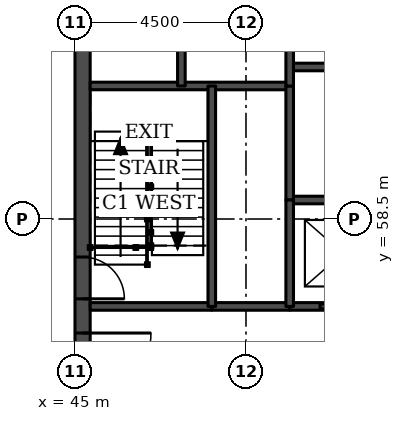
"""IFC4 building model, lengths in metres.
Left out: names, types, materials, properties, quantities, classifications, styles, units other than length and angle.
Written with IfcOpenShell. Run it as: python <this file> out.ifc"""

import sys

from ifc_helpers import new_model, si_unit, direction, frame, frame_2d, origin, place, context, subcontext, project, spatial, rectangle, extrude, element, fill, save


model = new_model("IFC4")
c1 = context("Model", 3, precision=1e-05, world=origin(), true_north=direction((0.0, 1.0)))
c2 = subcontext(c1, "Body", "Model", "MODEL_VIEW")
j1 = project(units=[si_unit("LENGTHUNIT", "METRE"), si_unit("PLANEANGLEUNIT", "RADIAN")], contexts=[c1])
p1 = place(None, origin())
s1 = spatial("IfcSite", under=j1, at=p1, CompositionType="ELEMENT")
p2 = place(p1, origin())
s2 = spatial("IfcBuilding", under=s1, at=p2, CompositionType="ELEMENT")
p3 = place(p2, frame((0.0, 0.0, 199.5)))
s3 = spatial("IfcBuildingStorey", under=s2, at=p3, CompositionType="ELEMENT", Elevation=199.5)
p4 = place(p3, frame((45.2, 49.5, 0.0), z_axis=(0.0, 0.0, 1.0), x_axis=(0.0, 1.0, 0.0)))
e1 = element("IfcWall", 1, at=p4, inside=s3, PredefinedType="SHEAR", context=c2, shape_type="SweptSolid", body=[
    extrude(rectangle(XDim=22.5, YDim=0.4, at=frame_2d((11.25, 0.0))), origin(), (0.0, 0.0, 1.0), 3.7),
])
p5 = place(p4, frame((4.2, 0.0, 0.0)))
e2 = element("IfcOpeningElement", 2, at=p5, cuts=e1, PredefinedType="OPENING", context=c2, shape_type="SweptSolid", body=[
    extrude(rectangle(XDim=1.8, YDim=2.1, at=frame_2d((0.9, 1.05))), frame((0.0, 0.21, 0.0), z_axis=(0.0, -1.0, 0.0), x_axis=(1.0, 0.0, 0.0)), (0.0, 0.0, 1.0), 0.42),
])
p6 = place(p4, frame((6.9, 0.0, 0.0)))
e3 = element("IfcOpeningElement", 3, at=p6, cuts=e1, PredefinedType="OPENING", context=c2, shape_type="SweptSolid", body=[
    extrude(rectangle(XDim=1.1, YDim=2.1, at=frame_2d((0.55, 1.05))), frame((0.0, 0.21, 0.0), z_axis=(0.0, -1.0, 0.0), x_axis=(1.0, 0.0, 0.0)), (0.0, 0.0, 1.0), 0.42),
])
p7 = place(p4, frame((13.6, 0.0, 0.0)))
e4 = element("IfcOpeningElement", 4, at=p7, cuts=e1, PredefinedType="OPENING", context=c2, shape_type="SweptSolid", body=[
    extrude(rectangle(XDim=1.1, YDim=2.1, at=frame_2d((0.55, 1.05))), frame((0.0, 0.21, 0.0), z_axis=(0.0, -1.0, 0.0), x_axis=(1.0, 0.0, 0.0)), (0.0, 0.0, 1.0), 0.42),
])
p8 = place(p4, frame((16.5, 0.0, 0.0)))
e5 = element("IfcOpeningElement", 5, at=p8, cuts=e1, PredefinedType="OPENING", context=c2, shape_type="SweptSolid", body=[
    extrude(rectangle(XDim=1.8, YDim=2.1, at=frame_2d((0.9, 1.05))), frame((0.0, 0.21, 0.0), z_axis=(0.0, -1.0, 0.0), x_axis=(1.0, 0.0, 0.0)), (0.0, 0.0, 1.0), 0.42),
])
p9 = place(p3, frame((48.6, 56.2, 0.0), z_axis=(0.0, 0.0, 1.0), x_axis=(1.0, 0.0, 0.0)))
e6 = element("IfcWall", 6, at=p9, inside=s3, PredefinedType="SOLIDWALL", context=c2, shape_type="SweptSolid", body=[
    extrude(rectangle(XDim=2.05, YDim=0.2, at=frame_2d((1.025, 0.0))), origin(), (0.0, 0.0, 1.0), 3.55),
])
p10 = place(p3, frame((45.4, 56.2, 0.0), z_axis=(0.0, 0.0, 1.0), x_axis=(1.0, 0.0, 0.0)))
e7 = element("IfcWall", 7, at=p10, inside=s3, PredefinedType="SOLIDWALL", context=c2, shape_type="SweptSolid", body=[
    extrude(rectangle(XDim=3.2, YDim=0.2, at=frame_2d((1.6, 0.0))), origin(), (0.0, 0.0, 1.0), 3.55),
])
p11 = place(p3, frame((50.65, 56.2, 0.0), z_axis=(0.0, 0.0, 1.0), x_axis=(1.0, 0.0, 0.0)))
e8 = element("IfcWall", 8, at=p11, inside=s3, PredefinedType="SOLIDWALL", context=c2, shape_type="SweptSolid", body=[
    extrude(rectangle(XDim=11.2, YDim=0.2, at=frame_2d((5.6, 0.0))), origin(), (0.0, 0.0, 1.0), 3.55),
])
p12 = place(p11, frame((0.8, 0.0, 0.0)))
e9 = element("IfcOpeningElement", 9, at=p12, cuts=e8, PredefinedType="OPENING", context=c2, shape_type="SweptSolid", body=[
    extrude(rectangle(XDim=1.2, YDim=2.1, at=frame_2d((0.6, 1.05))), frame((0.0, 0.11, 0.0), z_axis=(0.0, -1.0, 0.0), x_axis=(1.0, 0.0, 0.0)), (0.0, 0.0, 1.0), 0.22),
])
p13 = place(p11, frame((3.6, 0.0, 0.0)))
e10 = element("IfcOpeningElement", 10, at=p13, cuts=e8, PredefinedType="OPENING", context=c2, shape_type="SweptSolid", body=[
    extrude(rectangle(XDim=1.2, YDim=2.1, at=frame_2d((0.6, 1.05))), frame((0.0, 0.11, 0.0), z_axis=(0.0, -1.0, 0.0), x_axis=(1.0, 0.0, 0.0)), (0.0, 0.0, 1.0), 0.22),
])
p14 = place(p11, frame((6.4, 0.0, 0.0)))
e11 = element("IfcOpeningElement", 11, at=p14, cuts=e8, PredefinedType="OPENING", context=c2, shape_type="SweptSolid", body=[
    extrude(rectangle(XDim=1.2, YDim=2.1, at=frame_2d((0.6, 1.05))), frame((0.0, 0.11, 0.0), z_axis=(0.0, -1.0, 0.0), x_axis=(1.0, 0.0, 0.0)), (0.0, 0.0, 1.0), 0.22),
])
p15 = place(p11, frame((9.2, 0.0, 0.0)))
e12 = element("IfcOpeningElement", 12, at=p15, cuts=e8, PredefinedType="OPENING", context=c2, shape_type="SweptSolid", body=[
    extrude(rectangle(XDim=1.2, YDim=2.1, at=frame_2d((0.6, 1.05))), frame((0.0, 0.11, 0.0), z_axis=(0.0, -1.0, 0.0), x_axis=(1.0, 0.0, 0.0)), (0.0, 0.0, 1.0), 0.22),
])
p16 = place(p3, frame((50.65, 59.0, 0.0), z_axis=(0.0, 0.0, 1.0), x_axis=(1.0, 0.0, 0.0)))
e13 = element("IfcWall", 13, at=p16, inside=s3, PredefinedType="SOLIDWALL", context=c2, shape_type="SweptSolid", body=[
    extrude(rectangle(XDim=11.2, YDim=0.2, at=frame_2d((5.6, 0.0))), origin(), (0.0, 0.0, 1.0), 3.7),
])
p17 = place(p3, frame((45.4, 62.0, 0.0), z_axis=(0.0, 0.0, 1.0), x_axis=(1.0, 0.0, 0.0)))
e14 = element("IfcWall", 14, at=p17, inside=s3, PredefinedType="SOLIDWALL", context=c2, shape_type="SweptSolid", body=[
    extrude(rectangle(XDim=5.25, YDim=0.2, at=frame_2d((2.625, 0.0))), origin(), (0.0, 0.0, 1.0), 3.55),
])
p18 = place(p3, frame((50.65, 62.5, 0.0), z_axis=(0.0, 0.0, 1.0), x_axis=(1.0, 0.0, 0.0)))
e15 = element("IfcWall", 15, at=p18, inside=s3, PredefinedType="SOLIDWALL", context=c2, shape_type="SweptSolid", body=[
    extrude(rectangle(XDim=11.2, YDim=0.2, at=frame_2d((5.6, 0.0))), origin(), (0.0, 0.0, 1.0), 3.7),
])
p19 = place(p3, frame((47.8, 62.0, 0.0), z_axis=(0.0, 0.0, 1.0), x_axis=(0.0, 1.0, 0.0)))
e16 = element("IfcWall", 16, at=p19, inside=s3, PredefinedType="SOLIDWALL", context=c2, shape_type="SweptSolid", body=[
    extrude(rectangle(XDim=3.3, YDim=0.2, at=frame_2d((1.65, 0.0))), origin(), (0.0, 0.0, 1.0), 3.55),
])
p20 = place(p19, frame((1.1, 0.0, 0.0)))
e17 = element("IfcOpeningElement", 17, at=p20, cuts=e16, PredefinedType="OPENING", context=c2, shape_type="SweptSolid", body=[
    extrude(rectangle(XDim=1.1, YDim=2.1, at=frame_2d((0.55, 1.05))), frame((0.0, 0.11, 0.0), z_axis=(0.0, -1.0, 0.0), x_axis=(1.0, 0.0, 0.0)), (0.0, 0.0, 1.0), 0.22),
])
p21 = place(p3, frame((48.6, 56.2, 0.0), z_axis=(0.0, 0.0, 1.0), x_axis=(0.0, 1.0, 0.0)))
e18 = element("IfcWall", 18, at=p21, inside=s3, PredefinedType="SOLIDWALL", context=c2, shape_type="SweptSolid", body=[
    extrude(rectangle(XDim=5.8, YDim=0.2, at=frame_2d((2.9, 0.0))), origin(), (0.0, 0.0, 1.0), 3.55),
])
p22 = place(p3, frame((50.65, 59.0, 0.0), z_axis=(0.0, 0.0, 1.0), x_axis=(0.0, 1.0, 0.0)))
e19 = element("IfcWall", 19, at=p22, inside=s3, PredefinedType="SOLIDWALL", context=c2, shape_type="SweptSolid", body=[
    extrude(rectangle(XDim=3.0, YDim=0.2, at=frame_2d((1.5, 0.0))), origin(), (0.0, 0.0, 1.0), 3.7),
])
p23 = place(p3, frame((50.65, 56.2, 0.0), z_axis=(0.0, 0.0, 1.0), x_axis=(0.0, 1.0, 0.0)))
e20 = element("IfcWall", 20, at=p23, inside=s3, PredefinedType="SOLIDWALL", context=c2, shape_type="SweptSolid", body=[
    extrude(rectangle(XDim=2.8, YDim=0.2, at=frame_2d((1.4, 0.0))), origin(), (0.0, 0.0, 1.0), 3.55),
])
p24 = place(p3, frame((50.65, 62.0, 0.0), z_axis=(0.0, 0.0, 1.0), x_axis=(0.0, 1.0, 0.0)))
e21 = element("IfcWall", 21, at=p24, inside=s3, PredefinedType="SOLIDWALL", context=c2, shape_type="SweptSolid", body=[
    extrude(rectangle(XDim=3.3, YDim=0.2, at=frame_2d((1.65, 0.0))), origin(), (0.0, 0.0, 1.0), 3.55),
])
p25 = place(p12, origin())
e22 = element("IfcDoor", 22, at=p25, inside=s3, OperationType="DOUBLE_DOOR_SLIDING", PredefinedType="DOOR", context=c2, shape_type="SweptSolid", body=[
    extrude(rectangle(XDim=1.2, YDim=2.1, at=frame_2d((0.6, 1.05))), frame((0.0, 0.025, 0.0), z_axis=(0.0, -1.0, 0.0), x_axis=(1.0, 0.0, 0.0)), (0.0, 0.0, 1.0), 0.05),
])
fill(e9, e22)
p26 = place(p5, frame((1.8, 0.0, 0.0), z_axis=(0.0, 0.0, 1.0), x_axis=(-1.0, 0.0, 0.0)))
e23 = element("IfcDoor", 23, at=p26, inside=s3, OperationType="SINGLE_SWING_LEFT", PredefinedType="DOOR", context=c2, shape_type="SweptSolid", body=[
    extrude(rectangle(XDim=1.8, YDim=2.1, at=frame_2d((0.9, 1.05))), frame((0.0, 0.025, 0.0), z_axis=(0.0, -1.0, 0.0), x_axis=(1.0, 0.0, 0.0)), (0.0, 0.0, 1.0), 0.05),
])
fill(e2, e23)
p27 = place(p6, frame((1.1, 0.0, 0.0), z_axis=(0.0, 0.0, 1.0), x_axis=(-1.0, 0.0, 0.0)))
e24 = element("IfcDoor", 24, at=p27, inside=s3, OperationType="SINGLE_SWING_RIGHT", PredefinedType="DOOR", context=c2, shape_type="SweptSolid", body=[
    extrude(rectangle(XDim=1.1, YDim=2.1, at=frame_2d((0.55, 1.05))), frame((0.0, 0.025, 0.0), z_axis=(0.0, -1.0, 0.0), x_axis=(1.0, 0.0, 0.0)), (0.0, 0.0, 1.0), 0.05),
])
fill(e3, e24)
save(model, sys.argv[1])
